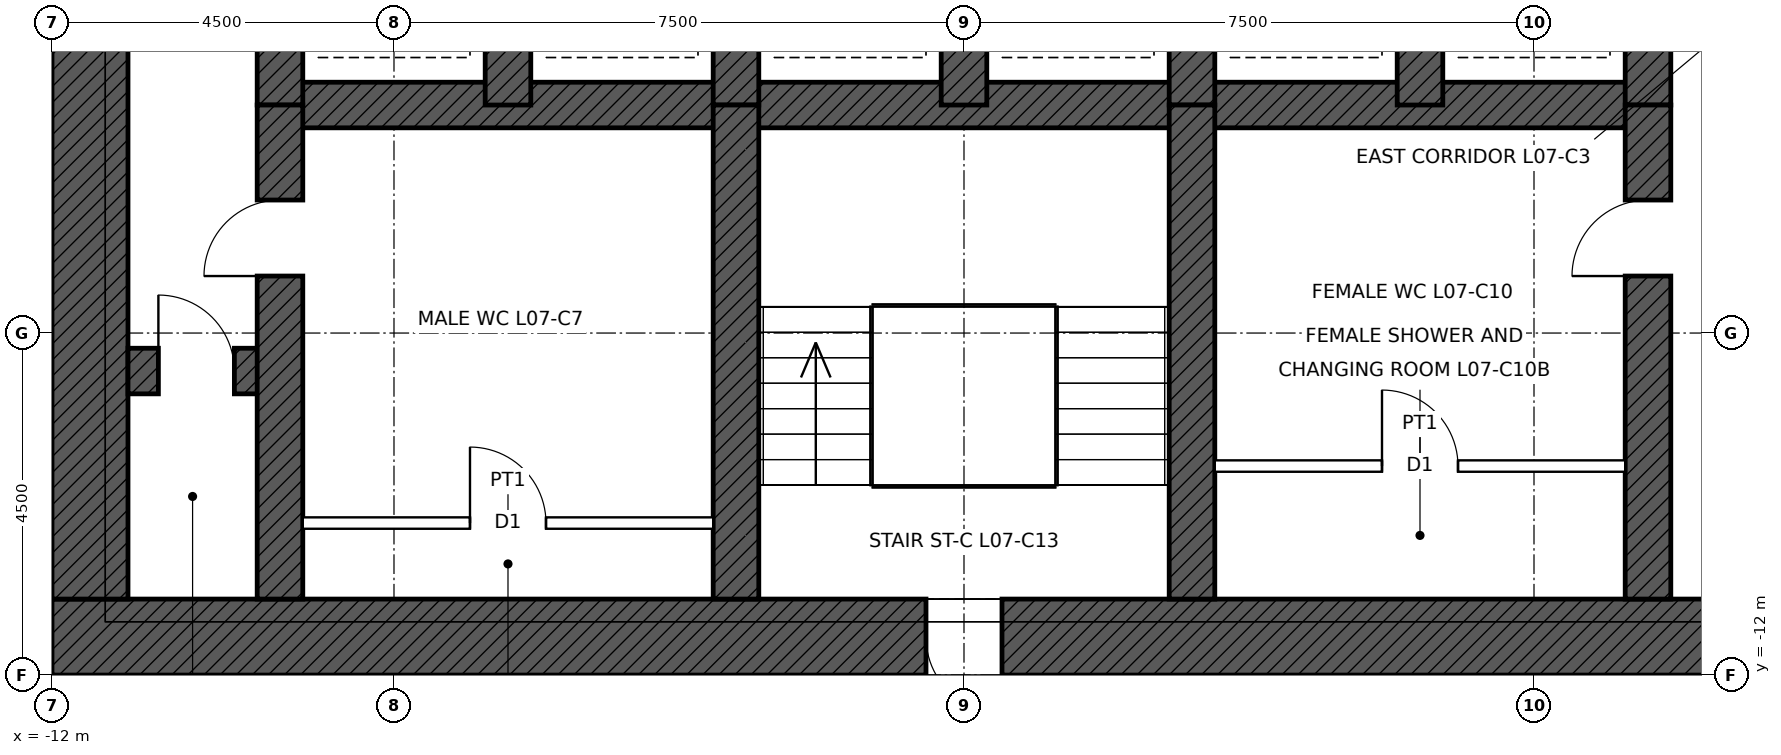
"""IFC4 building model, lengths in metres.
Left out: names, types, materials, properties, quantities, classifications, styles, units other than length and angle.
Written with IfcOpenShell. Run it as: python <this file> out.ifc"""

import sys

from ifc_helpers import new_model, si_unit, direction, frame, frame_2d, origin, place, context, subcontext, project, spatial, rectangle, extrude, element, fill, save


model = new_model("IFC4")
c1 = context("Model", 3, precision=1e-05, world=origin(), true_north=direction((0.0, 1.0)))
c2 = subcontext(c1, "Body", "Model", "MODEL_VIEW")
j1 = project(units=[si_unit("LENGTHUNIT", "METRE"), si_unit("PLANEANGLEUNIT", "RADIAN")], contexts=[c1])
p1 = place(None, origin())
s1 = spatial("IfcSite", under=j1, at=p1, CompositionType="ELEMENT")
p2 = place(p1, origin())
s2 = spatial("IfcBuilding", under=s1, at=p2, CompositionType="ELEMENT")
p3 = place(p2, frame((0.0, 0.0, 38.4)))
s3 = spatial("IfcBuildingStorey", under=s2, at=p3, CompositionType="ELEMENT", Elevation=38.4)
p4 = place(p3, frame((12.0, -11.5, 0.0), z_axis=(0.0, 0.0, 1.0), x_axis=(-1.0, 0.0, 0.0)))
e1 = element("IfcWall", 1, at=p4, inside=s3, PredefinedType="SHEAR", context=c2, shape_type="SweptSolid", body=[
    extrude(rectangle(XDim=24.0, YDim=1.0, at=frame_2d((12.0, 0.0))), origin(), (0.0, 0.0, 1.0), 5.0),
])
p5 = place(p4, frame((11.5, 0.0, 0.0)))
e2 = element("IfcOpeningElement", 2, at=p5, cuts=e1, PredefinedType="OPENING", context=c2, shape_type="SweptSolid", body=[
    extrude(rectangle(XDim=1.0, YDim=2.1, at=frame_2d((0.5, 1.05))), frame((0.0, 0.51, 0.0), z_axis=(0.0, -1.0, 0.0), x_axis=(1.0, 0.0, 0.0)), (0.0, 0.0, 1.0), 1.02),
])
p6 = place(p4, frame((1.0, 0.0, 0.0)))
e3 = element("IfcOpeningElement", 3, at=p6, cuts=e1, PredefinedType="OPENING", context=c2, shape_type="SweptSolid", body=[
    extrude(rectangle(XDim=1.0, YDim=2.4, at=frame_2d((0.5, 1.2))), frame((0.0, 0.51, 0.0), z_axis=(0.0, -1.0, 0.0), x_axis=(1.0, 0.0, 0.0)), (0.0, 0.0, 1.0), 1.02),
])
p7 = place(p3, frame((-11.5, -11.0, 0.0), z_axis=(0.0, 0.0, 1.0), x_axis=(0.0, 1.0, 0.0)))
e4 = element("IfcWall", 4, at=p7, inside=s3, PredefinedType="SHEAR", context=c2, shape_type="SweptSolid", body=[
    extrude(rectangle(XDim=22.0, YDim=1.0, at=frame_2d((11.0, 0.0))), origin(), (0.0, 0.0, 1.0), 5.0),
])
p8 = place(p7, frame((10.5, 0.0, 0.0)))
e5 = element("IfcOpeningElement", 5, at=p8, cuts=e4, PredefinedType="OPENING", context=c2, shape_type="SweptSolid", body=[
    extrude(rectangle(XDim=1.0, YDim=2.4, at=frame_2d((0.5, 1.2))), frame((0.0, 0.51, 0.0), z_axis=(0.0, -1.0, 0.0), x_axis=(1.0, 0.0, 0.0)), (0.0, 0.0, 1.0), 1.02),
])
p9 = place(p3, frame((-9.0, -4.5, 0.0), z_axis=(0.0, 0.0, 1.0), x_axis=(1.0, 0.0, 0.0)))
e6 = element("IfcWall", 6, at=p9, inside=s3, PredefinedType="SHEAR", context=c2, shape_type="SweptSolid", body=[
    extrude(rectangle(XDim=18.0, YDim=0.6, at=frame_2d((9.0, 0.0))), origin(), (0.0, 0.0, 1.0), 5.0),
])
p10 = place(p3, frame((-11.0, -8.0, 0.0), z_axis=(0.0, 0.0, 1.0), x_axis=(1.0, 0.0, 0.0)))
e7 = element("IfcWall", 7, at=p10, inside=s3, PredefinedType="SHEAR", context=c2, shape_type="SweptSolid", body=[
    extrude(rectangle(XDim=2.0, YDim=0.6, at=frame_2d((1.0, 0.0))), origin(), (0.0, 0.0, 1.0), 5.0),
])
p11 = place(p10, frame((0.4, 0.0, 0.0)))
e8 = element("IfcOpeningElement", 8, at=p11, cuts=e7, PredefinedType="OPENING", context=c2, shape_type="SweptSolid", body=[
    extrude(rectangle(XDim=1.0, YDim=2.1, at=frame_2d((0.5, 1.05))), frame((0.0, 0.31, 0.0), z_axis=(0.0, -1.0, 0.0), x_axis=(1.0, 0.0, 0.0)), (0.0, 0.0, 1.0), 0.62),
])
for number, where, z_axis, x_axis in (
    (9, (-9.0, -4.5, 0.0), (0.0, 0.0, 1.0), (0.0, 1.0, 0.0)),
    (10, (9.0, -4.5, 0.0), (0.0, 0.0, 1.0), (0.0, 1.0, 0.0)),
    (11, (-6.0, -4.5, 0.0), (0.0, 0.0, 1.0), (0.0, 1.0, 0.0)),
    (12, (-3.0, -4.5, 0.0), (0.0, 0.0, 1.0), (0.0, 1.0, 0.0)),
    (13, (0.0, -4.5, 0.0), (0.0, 0.0, 1.0), (0.0, 1.0, 0.0)),
    (14, (3.0, -4.5, 0.0), (0.0, 0.0, 1.0), (0.0, 1.0, 0.0)),
    (15, (6.0, -4.5, 0.0), (0.0, 0.0, 1.0), (0.0, 1.0, 0.0)),
):
    element("IfcWall", number, at=place(p3, frame(where, z_axis=z_axis, x_axis=x_axis)), inside=s3, PredefinedType="SHEAR", context=c2, shape_type="SweptSolid", body=[
        extrude(rectangle(XDim=3.0, YDim=0.6, at=frame_2d((1.5, 0.0))), origin(), (0.0, 0.0, 1.0), 5.0),
    ])
p12 = place(p3, frame((-9.0, -11.0, 0.0), z_axis=(0.0, 0.0, 1.0), x_axis=(0.0, 1.0, 0.0)))
e16 = element("IfcWall", 16, at=p12, inside=s3, PredefinedType="SHEAR", context=c2, shape_type="SweptSolid", body=[
    extrude(rectangle(XDim=6.5, YDim=0.6, at=frame_2d((3.25, 0.0))), origin(), (0.0, 0.0, 1.0), 5.0),
])
p13 = place(p12, frame((4.25, 0.0, 0.0)))
e17 = element("IfcOpeningElement", 17, at=p13, cuts=e16, PredefinedType="OPENING", context=c2, shape_type="SweptSolid", body=[
    extrude(rectangle(XDim=1.0, YDim=2.1, at=frame_2d((0.5, 1.05))), frame((0.0, 0.31, 0.0), z_axis=(0.0, -1.0, 0.0), x_axis=(1.0, 0.0, 0.0)), (0.0, 0.0, 1.0), 0.62),
])
p14 = place(p3, frame((9.0, -11.0, 0.0), z_axis=(0.0, 0.0, 1.0), x_axis=(0.0, 1.0, 0.0)))
e18 = element("IfcWall", 18, at=p14, inside=s3, PredefinedType="SHEAR", context=c2, shape_type="SweptSolid", body=[
    extrude(rectangle(XDim=6.5, YDim=0.6, at=frame_2d((3.25, 0.0))), origin(), (0.0, 0.0, 1.0), 5.0),
])
p15 = place(p14, frame((4.25, 0.0, 0.0)))
e19 = element("IfcOpeningElement", 19, at=p15, cuts=e18, PredefinedType="OPENING", context=c2, shape_type="SweptSolid", body=[
    extrude(rectangle(XDim=1.0, YDim=2.1, at=frame_2d((0.5, 1.05))), frame((0.0, 0.31, 0.0), z_axis=(0.0, -1.0, 0.0), x_axis=(1.0, 0.0, 0.0)), (0.0, 0.0, 1.0), 0.62),
])
for number, where, z_axis, x_axis in (
    (20, (-3.0, -11.0, 0.0), (0.0, 0.0, 1.0), (0.0, 1.0, 0.0)),
    (21, (3.0, -11.0, 0.0), (0.0, 0.0, 1.0), (0.0, 1.0, 0.0)),
):
    element("IfcWall", number, at=place(p3, frame(where, z_axis=z_axis, x_axis=x_axis)), inside=s3, PredefinedType="SHEAR", context=c2, shape_type="SweptSolid", body=[
        extrude(rectangle(XDim=6.5, YDim=0.6, at=frame_2d((3.25, 0.0))), origin(), (0.0, 0.0, 1.0), 5.0),
    ])
p16 = place(p3, frame((-8.7, -10.0, 0.0), z_axis=(0.0, 0.0, 1.0), x_axis=(1.0, 0.0, 0.0)))
e22 = element("IfcWall", 22, at=p16, inside=s3, PredefinedType="PARTITIONING", context=c2, shape_type="SweptSolid", body=[
    extrude(rectangle(XDim=5.4, YDim=0.15, at=frame_2d((2.7, 0.0))), origin(), (0.0, 0.0, 1.0), 4.75),
])
p17 = place(p16, frame((2.2, 0.0, 0.0)))
e23 = element("IfcOpeningElement", 23, at=p17, cuts=e22, PredefinedType="OPENING", context=c2, shape_type="SweptSolid", body=[
    extrude(rectangle(XDim=1.0, YDim=2.1, at=frame_2d((0.5, 1.05))), frame((0.0, 0.085, 0.0), z_axis=(0.0, -1.0, 0.0), x_axis=(1.0, 0.0, 0.0)), (0.0, 0.0, 1.0), 0.17),
])
p18 = place(p3, frame((3.3, -9.25, 0.0), z_axis=(0.0, 0.0, 1.0), x_axis=(1.0, 0.0, 0.0)))
e24 = element("IfcWall", 24, at=p18, inside=s3, PredefinedType="PARTITIONING", context=c2, shape_type="SweptSolid", body=[
    extrude(rectangle(XDim=5.4, YDim=0.15, at=frame_2d((2.7, 0.0))), origin(), (0.0, 0.0, 1.0), 4.75),
])
p19 = place(p18, frame((2.2, 0.0, 0.0)))
e25 = element("IfcOpeningElement", 25, at=p19, cuts=e24, PredefinedType="OPENING", context=c2, shape_type="SweptSolid", body=[
    extrude(rectangle(XDim=1.0, YDim=2.1, at=frame_2d((0.5, 1.05))), frame((0.0, 0.085, 0.0), z_axis=(0.0, -1.0, 0.0), x_axis=(1.0, 0.0, 0.0)), (0.0, 0.0, 1.0), 0.17),
])
p20 = place(p5, origin())
e26 = element("IfcDoor", 26, at=p20, inside=s3, OperationType="SINGLE_SWING_LEFT", PredefinedType="DOOR", context=c2, shape_type="SweptSolid", body=[
    extrude(rectangle(XDim=1.0, YDim=2.1, at=frame_2d((0.5, 1.05))), frame((0.0, 0.485, 0.0), z_axis=(0.0, -1.0, 0.0), x_axis=(1.0, 0.0, 0.0)), (0.0, 0.0, 1.0), 0.05),
])
fill(e2, e26)
p21 = place(p13, origin())
e27 = element("IfcDoor", 27, at=p21, inside=s3, OperationType="SINGLE_SWING_LEFT", PredefinedType="DOOR", context=c2, shape_type="SweptSolid", body=[
    extrude(rectangle(XDim=1.0, YDim=2.1, at=frame_2d((0.5, 1.05))), frame((0.0, 0.025, 0.0), z_axis=(0.0, -1.0, 0.0), x_axis=(1.0, 0.0, 0.0)), (0.0, 0.0, 1.0), 0.05),
])
fill(e17, e27)
p22 = place(p15, origin())
e28 = element("IfcDoor", 28, at=p22, inside=s3, OperationType="SINGLE_SWING_LEFT", PredefinedType="DOOR", context=c2, shape_type="SweptSolid", body=[
    extrude(rectangle(XDim=1.0, YDim=2.1, at=frame_2d((0.5, 1.05))), frame((0.0, 0.025, 0.0), z_axis=(0.0, -1.0, 0.0), x_axis=(1.0, 0.0, 0.0)), (0.0, 0.0, 1.0), 0.05),
])
fill(e19, e28)
p23 = place(p11, origin())
e29 = element("IfcDoor", 29, at=p23, inside=s3, OperationType="SINGLE_SWING_LEFT", PredefinedType="DOOR", context=c2, shape_type="SweptSolid", body=[
    extrude(rectangle(XDim=1.0, YDim=2.1, at=frame_2d((0.5, 1.05))), frame((0.0, 0.025, 0.0), z_axis=(0.0, -1.0, 0.0), x_axis=(1.0, 0.0, 0.0)), (0.0, 0.0, 1.0), 0.05),
])
fill(e8, e29)
p24 = place(p17, origin())
e30 = element("IfcDoor", 30, at=p24, inside=s3, OperationType="SINGLE_SWING_LEFT", PredefinedType="DOOR", context=c2, shape_type="SweptSolid", body=[
    extrude(rectangle(XDim=1.0, YDim=2.1, at=frame_2d((0.5, 1.05))), frame((0.0, 0.025, 0.0), z_axis=(0.0, -1.0, 0.0), x_axis=(1.0, 0.0, 0.0)), (0.0, 0.0, 1.0), 0.05),
])
fill(e23, e30)
p25 = place(p19, origin())
e31 = element("IfcDoor", 31, at=p25, inside=s3, OperationType="SINGLE_SWING_LEFT", PredefinedType="DOOR", context=c2, shape_type="SweptSolid", body=[
    extrude(rectangle(XDim=1.0, YDim=2.1, at=frame_2d((0.5, 1.05))), frame((0.0, 0.025, 0.0), z_axis=(0.0, -1.0, 0.0), x_axis=(1.0, 0.0, 0.0)), (0.0, 0.0, 1.0), 0.05),
])
fill(e25, e31)
save(model, sys.argv[1])
